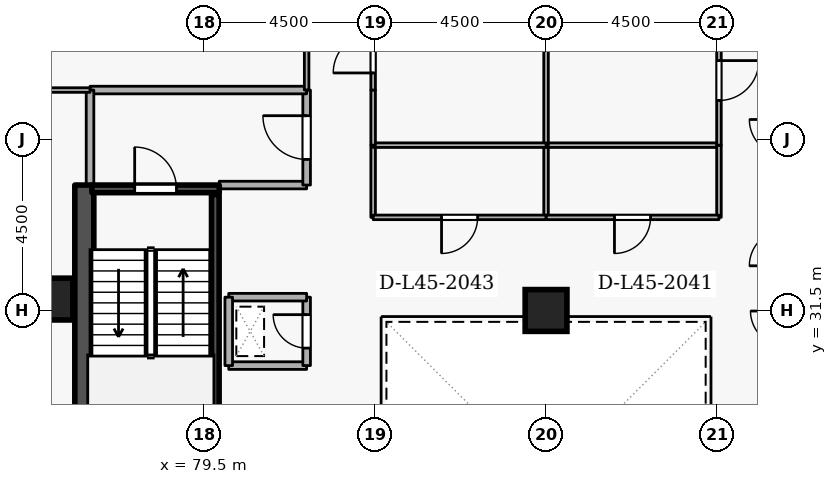
"""IFC4 building model, lengths in metres.
Left out: names, types, materials, properties, quantities, classifications, styles, units other than length and angle.
Written with IfcOpenShell. Run it as: python <this file> out.ifc"""

import sys

from ifc_helpers import new_model, si_unit, direction, frame, frame_2d, origin, origin_2d, place, context, subcontext, project, spatial, rectangle, extrude, element, fill, save


model = new_model("IFC4")
c1 = context("Model", 3, precision=1e-05, world=origin(), true_north=direction((0.0, 1.0)))
c2 = subcontext(c1, "Body", "Model", "MODEL_VIEW")
j1 = project(units=[si_unit("LENGTHUNIT", "METRE"), si_unit("PLANEANGLEUNIT", "RADIAN")], contexts=[c1])
p1 = place(None, origin())
s1 = spatial("IfcSite", under=j1, at=p1, CompositionType="ELEMENT")
p2 = place(p1, origin())
s2 = spatial("IfcBuilding", under=s1, at=p2, CompositionType="ELEMENT")
p3 = place(p2, frame((0.0, 0.0, 170.7)))
s3 = spatial("IfcBuildingStorey", under=s2, at=p3, CompositionType="ELEMENT", Elevation=170.7)
p4 = place(p3, frame((76.35, 19.2, 0.0), z_axis=(0.0, 0.0, 1.0), x_axis=(0.0, 1.0, 0.0)))
e1 = element("IfcWall", 1, at=p4, inside=s3, PredefinedType="SHEAR", context=c2, shape_type="SweptSolid", body=[
    extrude(rectangle(XDim=15.6, YDim=0.5, at=frame_2d((7.8, 0.0))), origin(), (0.0, 0.0, 1.0), 3.6),
])
for number, where, z_axis, x_axis in (
    (2, (75.5, 31.8, 0.0), (0.0, 0.0, 1.0), (1.0, 0.0, 0.0)),
    (3, (88.5, 31.5, 0.0), (0.0, 0.0, 1.0), (1.0, 0.0, 0.0)),
):
    element("IfcColumn", number, at=place(p3, frame(where, z_axis=z_axis, x_axis=x_axis)), inside=s3, PredefinedType="COLUMN", context=c2, shape_type="SweptSolid", body=[
        extrude(rectangle(XDim=1.1, YDim=1.1, at=origin_2d()), origin(), (0.0, 0.0, 1.0), 3.6),
    ])
p5 = place(p3, frame((76.55, 34.7, 0.0), z_axis=(0.0, 0.0, 1.0), x_axis=(1.0, 0.0, 0.0)))
e4 = element("IfcWall", 4, at=p5, inside=s3, PredefinedType="SHEAR", context=c2, shape_type="SweptSolid", body=[
    extrude(rectangle(XDim=3.35, YDim=0.2, at=frame_2d((1.675, 0.0))), origin(), (0.0, 0.0, 1.0), 3.6),
])
p6 = place(p5, frame((1.125, 0.0, 0.0)))
e5 = element("IfcOpeningElement", 5, at=p6, cuts=e4, PredefinedType="OPENING", context=c2, shape_type="SweptSolid", body=[
    extrude(rectangle(XDim=1.1, YDim=2.1, at=frame_2d((0.55, 1.05))), frame((0.0, 0.11, 0.0), z_axis=(0.0, -1.0, 0.0), x_axis=(1.0, 0.0, 0.0)), (0.0, 0.0, 1.0), 0.22),
])
p7 = place(p3, frame((79.797, 27.45, 0.0), z_axis=(0.0, 0.0, 1.0), x_axis=(0.0, 1.0, 0.0)))
e6 = element("IfcWall", 6, at=p7, inside=s3, PredefinedType="SHEAR", context=c2, shape_type="SweptSolid", body=[
    extrude(rectangle(XDim=7.1, YDim=0.2, at=frame_2d((3.55, 0.0))), origin(), (0.0, 0.0, 1.0), 3.6),
])
p8 = place(p3, frame((79.9, 34.8, 0.0), z_axis=(0.0, 0.0, 1.0), x_axis=(1.0, 0.0, 0.0)))
e7 = element("IfcWall", 7, at=p8, inside=s3, PredefinedType="STANDARD", context=c2, shape_type="SweptSolid", body=[
    extrude(rectangle(XDim=2.3, YDim=0.2, at=frame_2d((1.15, 0.0))), origin(), (0.0, 0.0, 1.0), 2.465),
])
p9 = place(p3, frame((82.2, 34.8, 0.0), z_axis=(0.0, 0.0, 1.0), x_axis=(0.0, 1.0, 0.0)))
e8 = element("IfcWall", 8, at=p9, inside=s3, PredefinedType="STANDARD", context=c2, shape_type="SweptSolid", body=[
    extrude(rectangle(XDim=2.5, YDim=0.2, at=frame_2d((1.25, 0.0))), origin(), (0.0, 0.0, 1.0), 3.26),
])
p10 = place(p9, frame((0.675, 0.0, 0.0)))
e9 = element("IfcOpeningElement", 9, at=p10, cuts=e8, PredefinedType="OPENING", context=c2, shape_type="SweptSolid", body=[
    extrude(rectangle(XDim=1.15, YDim=2.1, at=frame_2d((0.575, 1.05))), frame((0.0, 0.11, 0.0), z_axis=(0.0, -1.0, 0.0), x_axis=(1.0, 0.0, 0.0)), (0.0, 0.0, 1.0), 0.22),
])
p11 = place(p3, frame((82.2, 37.3, 0.0), z_axis=(0.0, 0.0, 1.0), x_axis=(-1.0, 0.0, 0.0)))
e10 = element("IfcWall", 10, at=p11, inside=s3, PredefinedType="STANDARD", context=c2, shape_type="SweptSolid", body=[
    extrude(rectangle(XDim=5.7, YDim=0.2, at=frame_2d((2.85, 0.0))), origin(), (0.0, 0.0, 1.0), 3.26),
])
p12 = place(p3, frame((76.5, 37.3, 0.0), z_axis=(0.0, 0.0, 1.0), x_axis=(0.0, -1.0, 0.0)))
e11 = element("IfcWall", 11, at=p12, inside=s3, PredefinedType="STANDARD", context=c2, shape_type="SweptSolid", body=[
    extrude(rectangle(XDim=2.5, YDim=0.2, at=frame_2d((1.25, 0.0))), origin(), (0.0, 0.0, 1.0), 3.26),
])
p13 = place(p3, frame((80.15, 30.05, 0.0), z_axis=(0.0, 0.0, 1.0), x_axis=(1.0, 0.0, 0.0)))
e12 = element("IfcWall", 12, at=p13, inside=s3, PredefinedType="STANDARD", context=c2, shape_type="SweptSolid", body=[
    extrude(rectangle(XDim=2.05, YDim=0.2, at=frame_2d((1.025, 0.0))), origin(), (0.0, 0.0, 1.0), 3.26),
])
p14 = place(p3, frame((82.2, 30.05, 0.0), z_axis=(0.0, 0.0, 1.0), x_axis=(0.0, 1.0, 0.0)))
e13 = element("IfcWall", 13, at=p14, inside=s3, PredefinedType="STANDARD", context=c2, shape_type="SweptSolid", body=[
    extrude(rectangle(XDim=1.8, YDim=0.2, at=frame_2d((0.9, 0.0))), origin(), (0.0, 0.0, 1.0), 3.26),
])
p15 = place(p14, frame((0.46, 0.0, 0.0)))
e14 = element("IfcOpeningElement", 14, at=p15, cuts=e13, PredefinedType="OPENING", context=c2, shape_type="SweptSolid", body=[
    extrude(rectangle(XDim=0.88, YDim=2.04, at=frame_2d((0.44, 1.02))), frame((0.0, 0.11, 0.0), z_axis=(0.0, -1.0, 0.0), x_axis=(1.0, 0.0, 0.0)), (0.0, 0.0, 1.0), 0.22),
])
p16 = place(p3, frame((82.2, 31.85, 0.0), z_axis=(0.0, 0.0, 1.0), x_axis=(-1.0, 0.0, 0.0)))
e15 = element("IfcWall", 15, at=p16, inside=s3, PredefinedType="STANDARD", context=c2, shape_type="SweptSolid", body=[
    extrude(rectangle(XDim=2.05, YDim=0.2, at=frame_2d((1.025, 0.0))), origin(), (0.0, 0.0, 1.0), 3.26),
])
p17 = place(p3, frame((80.15, 31.85, 0.0), z_axis=(0.0, 0.0, 1.0), x_axis=(0.0, -1.0, 0.0)))
e16 = element("IfcWall", 16, at=p17, inside=s3, PredefinedType="STANDARD", context=c2, shape_type="SweptSolid", body=[
    extrude(rectangle(XDim=1.8, YDim=0.2, at=frame_2d((0.9, 0.0))), origin(), (0.0, 0.0, 1.0), 3.26),
])
p18 = place(p3, frame((88.5, 33.95, 0.0), z_axis=(0.0, 0.0, 1.0), x_axis=(0.0, 1.0, 0.0)))
e17 = element("IfcWall", 17, at=p18, inside=s3, PredefinedType="PARTITIONING", context=c2, shape_type="SweptSolid", body=[
    extrude(rectangle(XDim=1.9, YDim=0.12, at=frame_2d((0.95, 0.0))), origin(), (0.0, 0.0, 1.0), 1.785),
])
p19 = place(p3, frame((88.5, 35.85, 0.0), z_axis=(0.0, 0.0, 1.0), x_axis=(1.0, 0.0, 0.0)))
e18 = element("IfcWall", 18, at=p19, inside=s3, PredefinedType="PARTITIONING", context=c2, shape_type="SweptSolid", body=[
    extrude(rectangle(XDim=4.55, YDim=0.12, at=frame_2d((2.275, 0.0))), origin(), (0.0, 0.0, 1.0), 3.26),
])
p20 = place(p3, frame((93.05, 35.85, 0.0), z_axis=(0.0, 0.0, 1.0), x_axis=(0.0, -1.0, 0.0)))
e19 = element("IfcWall", 19, at=p20, inside=s3, PredefinedType="PARTITIONING", context=c2, shape_type="SweptSolid", body=[
    extrude(rectangle(XDim=1.9, YDim=0.12, at=frame_2d((0.95, 0.0))), origin(), (0.0, 0.0, 1.0), 3.26),
])
p21 = place(p3, frame((93.05, 33.95, 0.0), z_axis=(0.0, 0.0, 1.0), x_axis=(-1.0, 0.0, 0.0)))
e20 = element("IfcWall", 20, at=p21, inside=s3, PredefinedType="PARTITIONING", context=c2, shape_type="SweptSolid", body=[
    extrude(rectangle(XDim=4.55, YDim=0.12, at=frame_2d((2.275, 0.0))), origin(), (0.0, 0.0, 1.0), 3.26),
])
p22 = place(p21, frame((1.8, 0.0, 0.0)))
e21 = element("IfcOpeningElement", 21, at=p22, cuts=e20, PredefinedType="OPENING", context=c2, shape_type="SweptSolid", body=[
    extrude(rectangle(XDim=0.95, YDim=2.1, at=frame_2d((0.475, 1.05))), frame((0.0, 0.07, 0.0), z_axis=(0.0, -1.0, 0.0), x_axis=(1.0, 0.0, 0.0)), (0.0, 0.0, 1.0), 0.14),
])
p23 = place(p3, frame((93.05, 39.25, 0.0), z_axis=(0.0, 0.0, 1.0), x_axis=(0.0, -1.0, 0.0)))
e22 = element("IfcWall", 22, at=p23, inside=s3, PredefinedType="PARTITIONING", context=c2, shape_type="SweptSolid", body=[
    extrude(rectangle(XDim=3.4, YDim=0.12, at=frame_2d((1.7, 0.0))), origin(), (0.0, 0.0, 1.0), 3.26),
])
p24 = place(p23, frame((1.175, 0.0, 0.0)))
e23 = element("IfcOpeningElement", 23, at=p24, cuts=e22, PredefinedType="OPENING", context=c2, shape_type="SweptSolid", body=[
    extrude(rectangle(XDim=1.05, YDim=2.1, at=frame_2d((0.525, 1.05))), frame((0.0, 0.07, 0.0), z_axis=(0.0, -1.0, 0.0), x_axis=(1.0, 0.0, 0.0)), (0.0, 0.0, 1.0), 0.14),
])
p25 = place(p3, frame((88.5, 35.85, 0.0), z_axis=(0.0, 0.0, 1.0), x_axis=(0.0, 1.0, 0.0)))
e24 = element("IfcWall", 24, at=p25, inside=s3, PredefinedType="PARTITIONING", context=c2, shape_type="SweptSolid", body=[
    extrude(rectangle(XDim=10.692, YDim=0.12, at=frame_2d((5.346, 0.0))), origin(), (0.0, 0.0, 1.0), 1.785),
])
p26 = place(p3, frame((83.95, 33.95, 0.0), z_axis=(0.0, 0.0, 1.0), x_axis=(0.0, 1.0, 0.0)))
e25 = element("IfcWall", 25, at=p26, inside=s3, PredefinedType="PARTITIONING", context=c2, shape_type="SweptSolid", body=[
    extrude(rectangle(XDim=1.9, YDim=0.12, at=frame_2d((0.95, 0.0))), origin(), (0.0, 0.0, 1.0), 3.26),
])
p27 = place(p3, frame((83.95, 35.85, 0.0), z_axis=(0.0, 0.0, 1.0), x_axis=(1.0, 0.0, 0.0)))
e26 = element("IfcWall", 26, at=p27, inside=s3, PredefinedType="PARTITIONING", context=c2, shape_type="SweptSolid", body=[
    extrude(rectangle(XDim=4.55, YDim=0.12, at=frame_2d((2.275, 0.0))), origin(), (0.0, 0.0, 1.0), 3.26),
])
p28 = place(p3, frame((88.5, 33.95, 0.0), z_axis=(0.0, 0.0, 1.0), x_axis=(-1.0, 0.0, 0.0)))
e27 = element("IfcWall", 27, at=p28, inside=s3, PredefinedType="PARTITIONING", context=c2, shape_type="SweptSolid", body=[
    extrude(rectangle(XDim=4.55, YDim=0.12, at=frame_2d((2.275, 0.0))), origin(), (0.0, 0.0, 1.0), 3.26),
])
p29 = place(p28, frame((1.8, 0.0, 0.0)))
e28 = element("IfcOpeningElement", 28, at=p29, cuts=e27, PredefinedType="OPENING", context=c2, shape_type="SweptSolid", body=[
    extrude(rectangle(XDim=0.95, YDim=2.1, at=frame_2d((0.475, 1.05))), frame((0.0, 0.07, 0.0), z_axis=(0.0, -1.0, 0.0), x_axis=(1.0, 0.0, 0.0)), (0.0, 0.0, 1.0), 0.14),
])
p30 = place(p3, frame((83.95, 35.85, 0.0), z_axis=(0.0, 0.0, 1.0), x_axis=(0.0, 1.0, 0.0)))
e29 = element("IfcWall", 29, at=p30, inside=s3, PredefinedType="PARTITIONING", context=c2, shape_type="SweptSolid", body=[
    extrude(rectangle(XDim=1.45, YDim=0.12, at=frame_2d((0.725, 0.0))), origin(), (0.0, 0.0, 1.0), 3.26),
])
p31 = place(p3, frame((83.95, 37.3, 0.0), z_axis=(0.0, 0.0, 1.0), x_axis=(0.0, 1.0, 0.0)))
e30 = element("IfcWall", 30, at=p31, inside=s3, PredefinedType="PARTITIONING", context=c2, shape_type="SweptSolid", body=[
    extrude(rectangle(XDim=1.95, YDim=0.12, at=frame_2d((0.975, 0.0))), origin(), (0.0, 0.0, 1.0), 3.26),
])
p32 = place(p31, frame((0.45, 0.0, 0.0)))
e31 = element("IfcOpeningElement", 31, at=p32, cuts=e30, PredefinedType="OPENING", context=c2, shape_type="SweptSolid", body=[
    extrude(rectangle(XDim=1.05, YDim=2.1, at=frame_2d((0.525, 1.05))), frame((0.0, 0.07, 0.0), z_axis=(0.0, -1.0, 0.0), x_axis=(1.0, 0.0, 0.0)), (0.0, 0.0, 1.0), 0.14),
])
p33 = place(p3, frame((82.2, 39.25, 0.0), z_axis=(0.0, 0.0, 1.0), x_axis=(0.0, -1.0, 0.0)))
e32 = element("IfcWall", 32, at=p33, inside=s3, PredefinedType="PARTITIONING", context=c2, shape_type="SweptSolid", body=[
    extrude(rectangle(XDim=1.95, YDim=0.12, at=frame_2d((0.975, 0.0))), origin(), (0.0, 0.0, 1.0), 3.26),
])
p34 = place(p3, frame((76.5, 37.3, 0.0), z_axis=(0.0, 0.0, 1.0), x_axis=(-1.0, 0.0, 0.0)))
e33 = element("IfcWall", 33, at=p34, inside=s3, PredefinedType="PARTITIONING", context=c2, shape_type="SweptSolid", body=[
    extrude(rectangle(XDim=5.72, YDim=0.12, at=frame_2d((2.86, 0.0))), origin(), (0.0, 0.0, 1.0), 3.26),
])
p35 = place(p6, origin())
e34 = element("IfcDoor", 34, at=p35, inside=s3, OperationType="SINGLE_SWING_LEFT", PredefinedType="DOOR", context=c2, shape_type="SweptSolid", body=[
    extrude(rectangle(XDim=1.1, YDim=2.1, at=frame_2d((0.55, 1.05))), frame((0.0, 0.025, 0.0), z_axis=(0.0, -1.0, 0.0), x_axis=(1.0, 0.0, 0.0)), (0.0, 0.0, 1.0), 0.05),
])
fill(e5, e34)
p36 = place(p10, origin())
e35 = element("IfcDoor", 35, at=p36, inside=s3, OperationType="SINGLE_SWING_RIGHT", PredefinedType="DOOR", context=c2, shape_type="SweptSolid", body=[
    extrude(rectangle(XDim=1.15, YDim=2.1, at=frame_2d((0.575, 1.05))), frame((0.0, 0.025, 0.0), z_axis=(0.0, -1.0, 0.0), x_axis=(1.0, 0.0, 0.0)), (0.0, 0.0, 1.0), 0.05),
])
fill(e9, e35)
p37 = place(p15, origin())
e36 = element("IfcDoor", 36, at=p37, inside=s3, OperationType="SINGLE_SWING_RIGHT", PredefinedType="DOOR", context=c2, shape_type="SweptSolid", body=[
    extrude(rectangle(XDim=0.88, YDim=2.04, at=frame_2d((0.44, 1.02))), frame((0.0, 0.025, 0.0), z_axis=(0.0, -1.0, 0.0), x_axis=(1.0, 0.0, 0.0)), (0.0, 0.0, 1.0), 0.05),
])
fill(e14, e36)
p38 = place(p22, origin())
e37 = element("IfcDoor", 37, at=p38, inside=s3, OperationType="SINGLE_SWING_RIGHT", PredefinedType="DOOR", context=c2, shape_type="SweptSolid", body=[
    extrude(rectangle(XDim=0.95, YDim=2.1, at=frame_2d((0.475, 1.05))), frame((0.0, 0.025, 0.0), z_axis=(0.0, -1.0, 0.0), x_axis=(1.0, 0.0, 0.0)), (0.0, 0.0, 1.0), 0.05),
])
fill(e21, e37)
p39 = place(p24, origin())
e38 = element("IfcDoor", 38, at=p39, inside=s3, OperationType="SINGLE_SWING_LEFT", PredefinedType="DOOR", context=c2, shape_type="SweptSolid", body=[
    extrude(rectangle(XDim=1.05, YDim=2.1, at=frame_2d((0.525, 1.05))), frame((0.0, 0.025, 0.0), z_axis=(0.0, -1.0, 0.0), x_axis=(1.0, 0.0, 0.0)), (0.0, 0.0, 1.0), 0.05),
])
fill(e23, e38)
p40 = place(p29, origin())
e39 = element("IfcDoor", 39, at=p40, inside=s3, OperationType="SINGLE_SWING_RIGHT", PredefinedType="DOOR", context=c2, shape_type="SweptSolid", body=[
    extrude(rectangle(XDim=0.95, YDim=2.1, at=frame_2d((0.475, 1.05))), frame((0.0, 0.025, 0.0), z_axis=(0.0, -1.0, 0.0), x_axis=(1.0, 0.0, 0.0)), (0.0, 0.0, 1.0), 0.05),
])
fill(e28, e39)
p41 = place(p32, origin())
e40 = element("IfcDoor", 40, at=p41, inside=s3, OperationType="SINGLE_SWING_LEFT", PredefinedType="DOOR", context=c2, shape_type="SweptSolid", body=[
    extrude(rectangle(XDim=1.05, YDim=2.1, at=frame_2d((0.525, 1.05))), frame((0.0, 0.025, 0.0), z_axis=(0.0, -1.0, 0.0), x_axis=(1.0, 0.0, 0.0)), (0.0, 0.0, 1.0), 0.05),
])
fill(e31, e40)
save(model, sys.argv[1])
